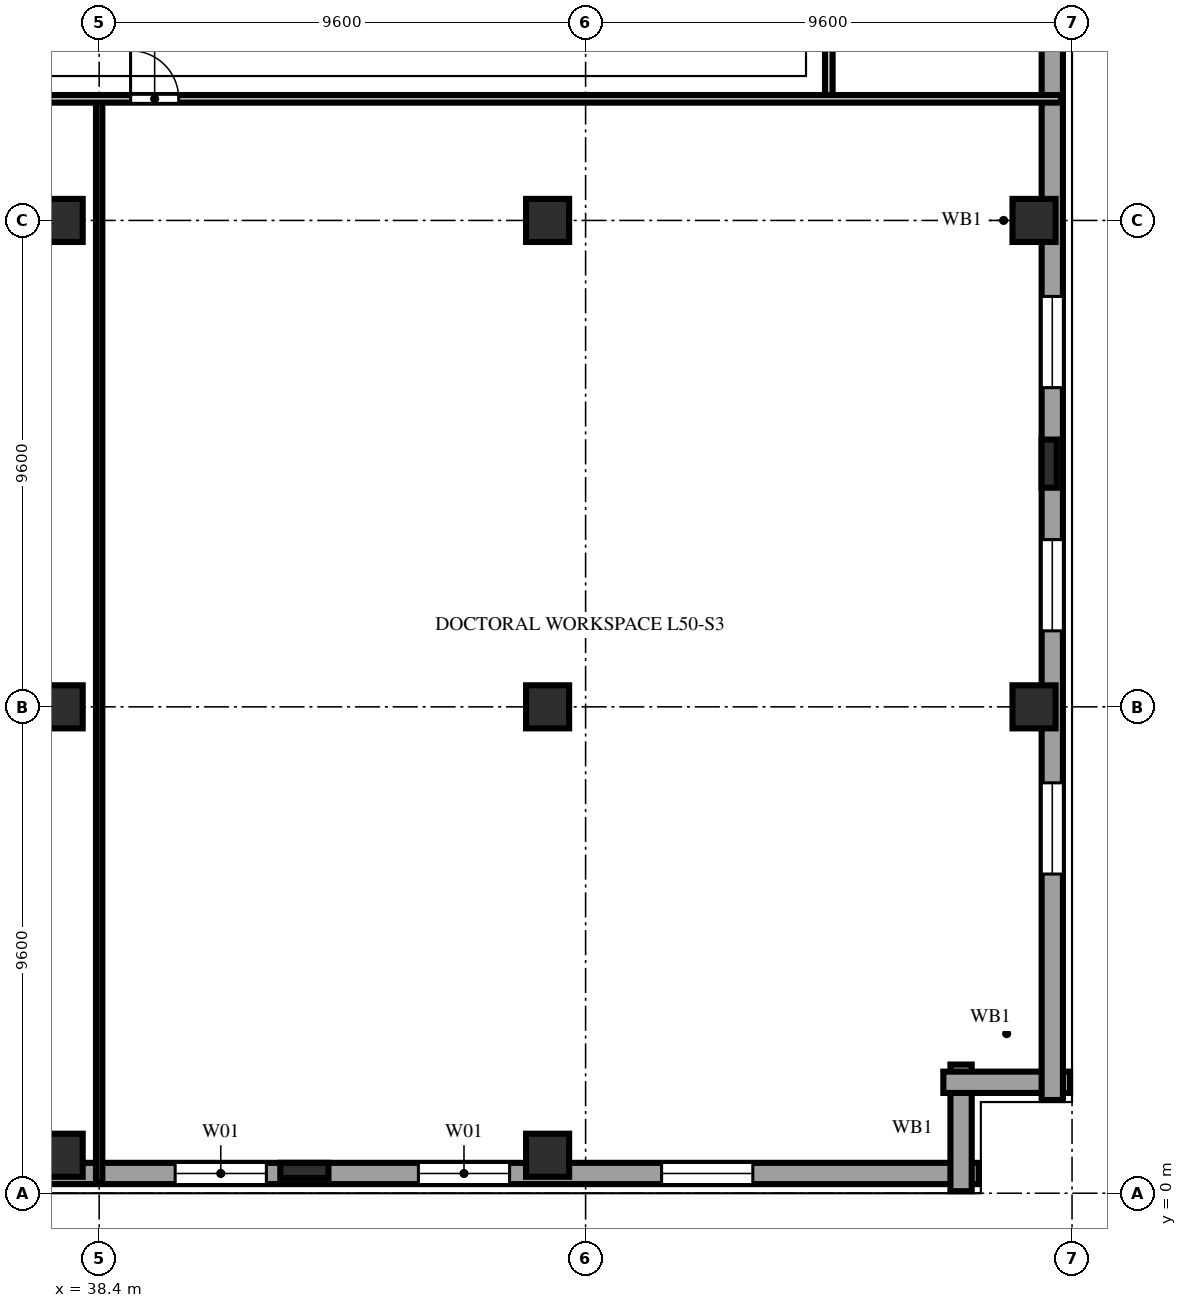
"""IFC4 building model, lengths in metres.
Left out: names, types, materials, properties, quantities, classifications, styles, units other than length and angle.
Written with IfcOpenShell. Run it as: python <this file> out.ifc"""

import sys

from ifc_helpers import new_model, si_unit, direction, frame, frame_2d, origin, origin_2d, place, context, subcontext, project, spatial, rectangle, extrude, element, fill, save


model = new_model("IFC4")
c1 = context("Model", 3, precision=1e-05, world=origin(), true_north=direction((0.0, 1.0)))
c2 = subcontext(c1, "Body", "Model", "MODEL_VIEW")
j1 = project(units=[si_unit("LENGTHUNIT", "METRE"), si_unit("PLANEANGLEUNIT", "RADIAN")], contexts=[c1])
p1 = place(None, origin())
s1 = spatial("IfcSite", under=j1, at=p1, CompositionType="ELEMENT")
p2 = place(p1, origin())
s2 = spatial("IfcBuilding", under=s1, at=p2, CompositionType="ELEMENT")
p3 = place(p2, frame((0.0, 0.0, 199.0)))
s3 = spatial("IfcBuildingStorey", under=s2, at=p3, CompositionType="ELEMENT", Elevation=199.0)
for number, where, z_axis, x_axis in (
    (1, (37.65, 0.75, 0.0), (0.0, 0.0, 1.0), (1.0, 0.0, 0.0)),
    (2, (37.65, 9.6, 0.0), (0.0, 0.0, 1.0), (1.0, 0.0, 0.0)),
    (3, (37.65, 19.2, 0.0), (0.0, 0.0, 1.0), (1.0, 0.0, 0.0)),
    (4, (47.25, 0.75, 0.0), (0.0, 0.0, 1.0), (1.0, 0.0, 0.0)),
    (5, (47.25, 9.6, 0.0), (0.0, 0.0, 1.0), (1.0, 0.0, 0.0)),
    (6, (47.25, 19.2, 0.0), (0.0, 0.0, 1.0), (1.0, 0.0, 0.0)),
    (7, (56.85, 9.6, 0.0), (0.0, 0.0, 1.0), (1.0, 0.0, 0.0)),
    (8, (56.85, 19.2, 0.0), (0.0, 0.0, 1.0), (1.0, 0.0, 0.0)),
):
    element("IfcColumn", number, at=place(p3, frame(where, z_axis=z_axis, x_axis=x_axis)), inside=s3, PredefinedType="COLUMN", context=c2, shape_type="SweptSolid", body=[
        extrude(rectangle(XDim=0.85, YDim=0.85, at=origin_2d()), origin(), (0.0, 0.0, 1.0), 3.8),
    ])
for number, where, z_axis, x_axis in (
    (9, (42.45, 0.45, 0.0), (0.0, 0.0, 1.0), (1.0, 0.0, 0.0)),
    (10, (57.15, 14.4, 0.0), (0.0, 0.0, 1.0), (0.0, 1.0, 0.0)),
):
    element("IfcColumn", number, at=place(p3, frame(where, z_axis=z_axis, x_axis=x_axis)), inside=s3, PredefinedType="PILASTER", context=c2, shape_type="SweptSolid", body=[
        extrude(rectangle(XDim=0.95, YDim=0.3, at=origin_2d()), origin(), (0.0, 0.0, 1.0), 3.8),
    ])
p4 = place(p3, frame((1.84, 0.39, 0.0), z_axis=(0.0, 0.0, 1.0), x_axis=(1.0, 0.0, 0.0)))
e11 = element("IfcWall", 11, at=p4, inside=s3, PredefinedType="SOLIDWALL", context=c2, shape_type="SweptSolid", body=[
    extrude(rectangle(XDim=53.92, YDim=0.42, at=frame_2d((26.96, 0.0))), origin(), (0.0, 0.0, 1.0), 3.54),
])
p5 = place(p4, frame((4.46, 0.0, 0.85)))
e12 = element("IfcOpeningElement", 12, at=p5, cuts=e11, PredefinedType="OPENING", context=c2, shape_type="SweptSolid", body=[
    extrude(rectangle(XDim=1.8, YDim=1.85, at=frame_2d((0.9, 0.925))), frame((0.0, 0.222, 0.0), z_axis=(0.0, -1.0, 0.0), x_axis=(1.0, 0.0, 0.0)), (0.0, 0.0, 1.0), 0.444),
])
p6 = place(p4, frame((9.26, 0.0, 0.85)))
e13 = element("IfcOpeningElement", 13, at=p6, cuts=e11, PredefinedType="OPENING", context=c2, shape_type="SweptSolid", body=[
    extrude(rectangle(XDim=1.8, YDim=1.85, at=frame_2d((0.9, 0.925))), frame((0.0, 0.222, 0.0), z_axis=(0.0, -1.0, 0.0), x_axis=(1.0, 0.0, 0.0)), (0.0, 0.0, 1.0), 0.444),
])
p7 = place(p4, frame((18.86, 0.0, 0.85)))
e14 = element("IfcOpeningElement", 14, at=p7, cuts=e11, PredefinedType="OPENING", context=c2, shape_type="SweptSolid", body=[
    extrude(rectangle(XDim=1.8, YDim=1.85, at=frame_2d((0.9, 0.925))), frame((0.0, 0.222, 0.0), z_axis=(0.0, -1.0, 0.0), x_axis=(1.0, 0.0, 0.0)), (0.0, 0.0, 1.0), 0.444),
])
p8 = place(p4, frame((28.46, 0.0, 0.85)))
e15 = element("IfcOpeningElement", 15, at=p8, cuts=e11, PredefinedType="OPENING", context=c2, shape_type="SweptSolid", body=[
    extrude(rectangle(XDim=1.8, YDim=1.85, at=frame_2d((0.9, 0.925))), frame((0.0, 0.222, 0.0), z_axis=(0.0, -1.0, 0.0), x_axis=(1.0, 0.0, 0.0)), (0.0, 0.0, 1.0), 0.444),
])
p9 = place(p4, frame((33.26, 0.0, 0.85)))
e16 = element("IfcOpeningElement", 16, at=p9, cuts=e11, PredefinedType="OPENING", context=c2, shape_type="SweptSolid", body=[
    extrude(rectangle(XDim=1.8, YDim=1.85, at=frame_2d((0.9, 0.925))), frame((0.0, 0.222, 0.0), z_axis=(0.0, -1.0, 0.0), x_axis=(1.0, 0.0, 0.0)), (0.0, 0.0, 1.0), 0.444),
])
p10 = place(p4, frame((38.06, 0.0, 0.85)))
e17 = element("IfcOpeningElement", 17, at=p10, cuts=e11, PredefinedType="OPENING", context=c2, shape_type="SweptSolid", body=[
    extrude(rectangle(XDim=1.8, YDim=1.85, at=frame_2d((0.9, 0.925))), frame((0.0, 0.222, 0.0), z_axis=(0.0, -1.0, 0.0), x_axis=(1.0, 0.0, 0.0)), (0.0, 0.0, 1.0), 0.444),
])
p11 = place(p4, frame((42.86, 0.0, 0.85)))
e18 = element("IfcOpeningElement", 18, at=p11, cuts=e11, PredefinedType="OPENING", context=c2, shape_type="SweptSolid", body=[
    extrude(rectangle(XDim=1.8, YDim=1.85, at=frame_2d((0.9, 0.925))), frame((0.0, 0.222, 0.0), z_axis=(0.0, -1.0, 0.0), x_axis=(1.0, 0.0, 0.0)), (0.0, 0.0, 1.0), 0.444),
])
p12 = place(p4, frame((47.66, 0.0, 0.85)))
e19 = element("IfcOpeningElement", 19, at=p12, cuts=e11, PredefinedType="OPENING", context=c2, shape_type="SweptSolid", body=[
    extrude(rectangle(XDim=1.8, YDim=1.85, at=frame_2d((0.9, 0.925))), frame((0.0, 0.222, 0.0), z_axis=(0.0, -1.0, 0.0), x_axis=(1.0, 0.0, 0.0)), (0.0, 0.0, 1.0), 0.444),
])
for number, where, z_axis, x_axis in (
    (20, (55.41, 0.04, 0.0), (0.0, 0.0, 1.0), (0.0, 1.0, 0.0)),
    (21, (55.06, 2.19, 0.0), (0.0, 0.0, 1.0), (1.0, 0.0, 0.0)),
):
    element("IfcWall", number, at=place(p3, frame(where, z_axis=z_axis, x_axis=x_axis)), inside=s3, PredefinedType="SOLIDWALL", context=c2, shape_type="SweptSolid", body=[
        extrude(rectangle(XDim=2.5, YDim=0.42, at=frame_2d((1.25, 0.0))), origin(), (0.0, 0.0, 1.0), 3.54),
    ])
p13 = place(p3, frame((57.21, 1.84, 0.0), z_axis=(0.0, 0.0, 1.0), x_axis=(0.0, 1.0, 0.0)))
e22 = element("IfcWall", 22, at=p13, inside=s3, PredefinedType="SOLIDWALL", context=c2, shape_type="SweptSolid", body=[
    extrude(rectangle(XDim=34.72, YDim=0.42, at=frame_2d((17.36, 0.0))), origin(), (0.0, 0.0, 1.0), 3.54),
])
p14 = place(p13, frame((4.46, 0.0, 0.85)))
e23 = element("IfcOpeningElement", 23, at=p14, cuts=e22, PredefinedType="OPENING", context=c2, shape_type="SweptSolid", body=[
    extrude(rectangle(XDim=1.8, YDim=1.85, at=frame_2d((0.9, 0.925))), frame((0.0, 0.222, 0.0), z_axis=(0.0, -1.0, 0.0), x_axis=(1.0, 0.0, 0.0)), (0.0, 0.0, 1.0), 0.444),
])
p15 = place(p13, frame((9.26, 0.0, 0.85)))
e24 = element("IfcOpeningElement", 24, at=p15, cuts=e22, PredefinedType="OPENING", context=c2, shape_type="SweptSolid", body=[
    extrude(rectangle(XDim=1.8, YDim=1.85, at=frame_2d((0.9, 0.925))), frame((0.0, 0.222, 0.0), z_axis=(0.0, -1.0, 0.0), x_axis=(1.0, 0.0, 0.0)), (0.0, 0.0, 1.0), 0.444),
])
p16 = place(p13, frame((14.06, 0.0, 0.85)))
e25 = element("IfcOpeningElement", 25, at=p16, cuts=e22, PredefinedType="OPENING", context=c2, shape_type="SweptSolid", body=[
    extrude(rectangle(XDim=1.8, YDim=1.85, at=frame_2d((0.9, 0.925))), frame((0.0, 0.222, 0.0), z_axis=(0.0, -1.0, 0.0), x_axis=(1.0, 0.0, 0.0)), (0.0, 0.0, 1.0), 0.444),
])
p17 = place(p13, frame((23.66, 0.0, 0.85)))
e26 = element("IfcOpeningElement", 26, at=p17, cuts=e22, PredefinedType="OPENING", context=c2, shape_type="SweptSolid", body=[
    extrude(rectangle(XDim=1.8, YDim=1.85, at=frame_2d((0.9, 0.925))), frame((0.0, 0.222, 0.0), z_axis=(0.0, -1.0, 0.0), x_axis=(1.0, 0.0, 0.0)), (0.0, 0.0, 1.0), 0.444),
])
p18 = place(p13, frame((28.46, 0.0, 0.85)))
e27 = element("IfcOpeningElement", 27, at=p18, cuts=e22, PredefinedType="OPENING", context=c2, shape_type="SweptSolid", body=[
    extrude(rectangle(XDim=1.8, YDim=1.85, at=frame_2d((0.9, 0.925))), frame((0.0, 0.222, 0.0), z_axis=(0.0, -1.0, 0.0), x_axis=(1.0, 0.0, 0.0)), (0.0, 0.0, 1.0), 0.444),
])
p19 = place(p3, frame((52.8, 21.6, 0.0), z_axis=(0.0, 0.0, 1.0), x_axis=(0.0, 1.0, 0.0)))
e28 = element("IfcWall", 28, at=p19, inside=s3, PredefinedType="PARTITIONING", context=c2, shape_type="SweptSolid", body=[
    extrude(rectangle(XDim=2.1, YDim=0.15, at=frame_2d((1.05, 0.0))), origin(), (0.0, 0.0, 1.0), 3.54),
])
p20 = place(p3, frame((38.4, 0.22, 0.0), z_axis=(0.0, 0.0, 1.0), x_axis=(0.0, 1.0, 0.0)))
e29 = element("IfcWall", 29, at=p20, inside=s3, PredefinedType="PARTITIONING", context=c2, shape_type="SweptSolid", body=[
    extrude(rectangle(XDim=21.38, YDim=0.125, at=frame_2d((10.69, 0.0))), origin(), (0.0, 0.0, 1.0), 3.54),
])
p21 = place(p3, frame((33.62, 21.6, 0.0), z_axis=(0.0, 0.0, 1.0), x_axis=(1.0, 0.0, 0.0)))
e30 = element("IfcWall", 30, at=p21, inside=s3, PredefinedType="PARTITIONING", context=c2, shape_type="SweptSolid", body=[
    extrude(rectangle(XDim=23.76, YDim=0.15, at=frame_2d((11.88, 0.0))), origin(), (0.0, 0.0, 1.0), 3.54),
])
p22 = place(p21, frame((1.4, 0.0, 0.0)))
e31 = element("IfcOpeningElement", 31, at=p22, cuts=e30, PredefinedType="OPENING", context=c2, shape_type="SweptSolid", body=[
    extrude(rectangle(XDim=0.95, YDim=2.15, at=frame_2d((0.475, 1.075))), frame((0.0, 0.087, 0.0), z_axis=(0.0, -1.0, 0.0), x_axis=(1.0, 0.0, 0.0)), (0.0, 0.0, 1.0), 0.174),
])
p23 = place(p21, frame((5.4, 0.0, 0.0)))
e32 = element("IfcOpeningElement", 32, at=p23, cuts=e30, PredefinedType="OPENING", context=c2, shape_type="SweptSolid", body=[
    extrude(rectangle(XDim=0.95, YDim=2.15, at=frame_2d((0.475, 1.075))), frame((0.0, 0.087, 0.0), z_axis=(0.0, -1.0, 0.0), x_axis=(1.0, 0.0, 0.0)), (0.0, 0.0, 1.0), 0.174),
])
p24 = place(p10, origin())
e33 = element("IfcWindow", 33, at=p24, inside=s3, PartitioningType="DOUBLE_PANEL_VERTICAL", PredefinedType="WINDOW", context=c2, shape_type="SweptSolid", body=[
    extrude(rectangle(XDim=1.8, YDim=1.85, at=frame_2d((0.9, 0.925))), frame((0.0, 0.11, 0.0), z_axis=(0.0, -1.0, 0.0), x_axis=(1.0, 0.0, 0.0)), (0.0, 0.0, 1.0), 0.06),
])
fill(e17, e33)
p25 = place(p11, origin())
e34 = element("IfcWindow", 34, at=p25, inside=s3, PartitioningType="DOUBLE_PANEL_VERTICAL", PredefinedType="WINDOW", context=c2, shape_type="SweptSolid", body=[
    extrude(rectangle(XDim=1.8, YDim=1.85, at=frame_2d((0.9, 0.925))), frame((0.0, 0.11, 0.0), z_axis=(0.0, -1.0, 0.0), x_axis=(1.0, 0.0, 0.0)), (0.0, 0.0, 1.0), 0.06),
])
fill(e18, e34)
p26 = place(p12, origin())
e35 = element("IfcWindow", 35, at=p26, inside=s3, PartitioningType="DOUBLE_PANEL_VERTICAL", PredefinedType="WINDOW", context=c2, shape_type="SweptSolid", body=[
    extrude(rectangle(XDim=1.8, YDim=1.85, at=frame_2d((0.9, 0.925))), frame((0.0, 0.11, 0.0), z_axis=(0.0, -1.0, 0.0), x_axis=(1.0, 0.0, 0.0)), (0.0, 0.0, 1.0), 0.06),
])
fill(e19, e35)
p27 = place(p14, origin())
e36 = element("IfcWindow", 36, at=p27, inside=s3, PartitioningType="DOUBLE_PANEL_VERTICAL", PredefinedType="WINDOW", context=c2, shape_type="SweptSolid", body=[
    extrude(rectangle(XDim=1.8, YDim=1.85, at=frame_2d((0.9, 0.925))), frame((0.0, 0.11, 0.0), z_axis=(0.0, -1.0, 0.0), x_axis=(1.0, 0.0, 0.0)), (0.0, 0.0, 1.0), 0.06),
])
fill(e23, e36)
p28 = place(p15, origin())
e37 = element("IfcWindow", 37, at=p28, inside=s3, PartitioningType="DOUBLE_PANEL_VERTICAL", PredefinedType="WINDOW", context=c2, shape_type="SweptSolid", body=[
    extrude(rectangle(XDim=1.8, YDim=1.85, at=frame_2d((0.9, 0.925))), frame((0.0, 0.11, 0.0), z_axis=(0.0, -1.0, 0.0), x_axis=(1.0, 0.0, 0.0)), (0.0, 0.0, 1.0), 0.06),
])
fill(e24, e37)
p29 = place(p16, origin())
e38 = element("IfcWindow", 38, at=p29, inside=s3, PartitioningType="DOUBLE_PANEL_VERTICAL", PredefinedType="WINDOW", context=c2, shape_type="SweptSolid", body=[
    extrude(rectangle(XDim=1.8, YDim=1.85, at=frame_2d((0.9, 0.925))), frame((0.0, 0.11, 0.0), z_axis=(0.0, -1.0, 0.0), x_axis=(1.0, 0.0, 0.0)), (0.0, 0.0, 1.0), 0.06),
])
fill(e25, e38)
p30 = place(p23, origin())
e39 = element("IfcDoor", 39, at=p30, inside=s3, OperationType="SINGLE_SWING_LEFT", PredefinedType="DOOR", context=c2, shape_type="SweptSolid", body=[
    extrude(rectangle(XDim=0.95, YDim=2.15, at=frame_2d((0.475, 1.075))), frame((0.0, 0.025, 0.0), z_axis=(0.0, -1.0, 0.0), x_axis=(1.0, 0.0, 0.0)), (0.0, 0.0, 1.0), 0.05),
])
fill(e32, e39)
save(model, sys.argv[1])
